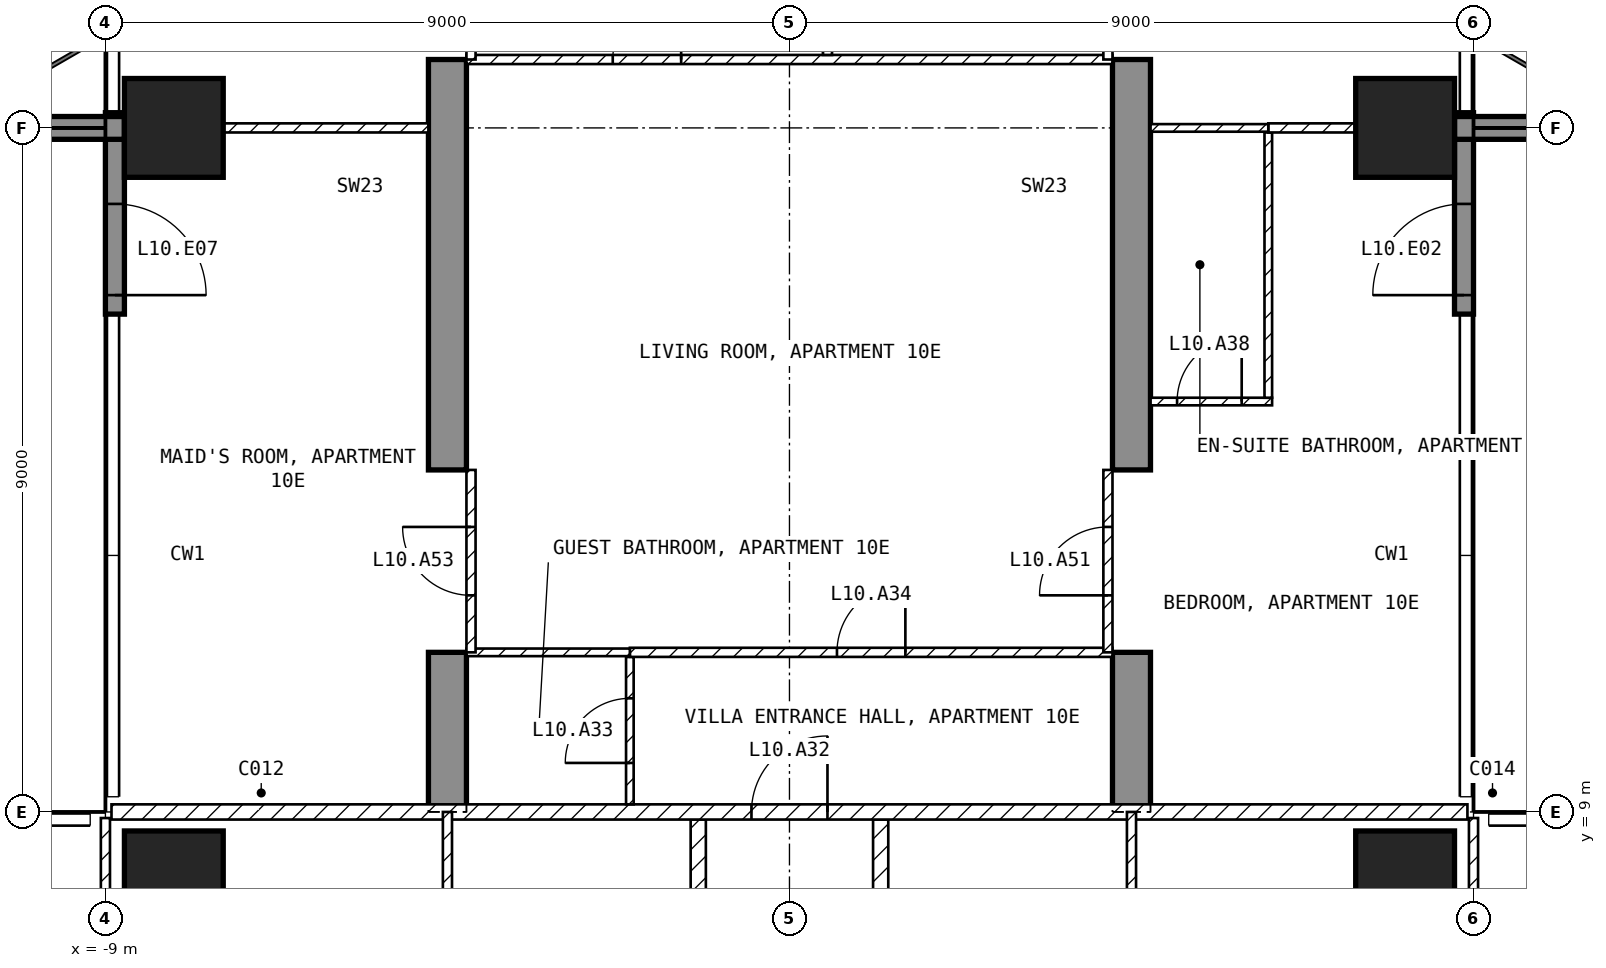
"""IFC4 building model, lengths in metres.
Left out: names, types, materials, properties, quantities, classifications, styles, units other than length and angle.
Written with IfcOpenShell. Run it as: python <this file> out.ifc"""

import sys

from ifc_helpers import new_model, si_unit, direction, frame, frame_2d, origin, origin_2d, place, context, subcontext, project, spatial, polyline, rectangle, outline, extrude, element, fill, save


model = new_model("IFC4")
c1 = context("Model", 3, precision=1e-05, world=origin(), true_north=direction((0.0, 1.0)))
c2 = subcontext(c1, "Body", "Model", "MODEL_VIEW")
j1 = project(units=[si_unit("LENGTHUNIT", "METRE"), si_unit("PLANEANGLEUNIT", "RADIAN")], contexts=[c1])
p1 = place(None, origin())
s1 = spatial("IfcSite", under=j1, at=p1, CompositionType="ELEMENT")
p2 = place(p1, origin())
s2 = spatial("IfcBuilding", under=s1, at=p2, CompositionType="ELEMENT")
p3 = place(p2, frame((0.0, 0.0, 54.0)))
s3 = spatial("IfcBuildingStorey", under=s2, at=p3, CompositionType="ELEMENT", Elevation=54.0)
for number, where, z_axis, x_axis in (
    (1, (-8.1, 8.1, -0.25), (0.0, 0.0, 1.0), (1.0, 0.0, 0.0)),
    (2, (-8.1, 18.0, -0.25), (0.0, 0.0, 1.0), (1.0, 0.0, 0.0)),
    (3, (8.1, 8.1, -0.25), (0.0, 0.0, 1.0), (1.0, 0.0, 0.0)),
    (4, (8.1, 18.0, -0.25), (0.0, 0.0, 1.0), (1.0, 0.0, 0.0)),
):
    element("IfcColumn", number, at=place(p3, frame(where, z_axis=z_axis, x_axis=x_axis)), inside=s3, PredefinedType="COLUMN", context=c2, shape_type="SweptSolid", body=[
        extrude(rectangle(XDim=1.3, YDim=1.3, at=origin_2d()), origin(), (0.0, 0.0, 1.0), 3.5),
    ])
for number, where, z_axis, x_axis in (
    (5, (-4.75, 9.0, -0.25), (1.0, 0.0, 0.0), (0.0, 1.0, 0.0)),
    (6, (4.25, 9.0, -0.25), (1.0, 0.0, 0.0), (0.0, 1.0, 0.0)),
):
    element("IfcWall", number, at=place(p3, frame(where, z_axis=z_axis, x_axis=x_axis)), inside=s3, PredefinedType="SHEAR", context=c2, shape_type="SweptSolid", body=[
        extrude(outline(polyline([(0.0, 0.0), (2.1, 0.0), (2.1, 2.65), (4.5, 2.65), (4.5, 0.0), (9.9, 0.0), (9.9, 2.65), (12.3, 2.65), (12.3, 0.0), (16.45, 0.0), (16.45, 3.5), (0.0, 3.5), (0.0, 0.0)])), origin(), (0.0, 0.0, 1.0), 0.5),
    ])
p4 = place(p3, frame((8.875, 15.55, 0.0), z_axis=(0.0, 0.0, 1.0), x_axis=(0.0, 1.0, 0.0)))
e7 = element("IfcWall", 7, at=p4, inside=s3, PredefinedType="SOLIDWALL", context=c2, shape_type="SweptSolid", body=[
    extrude(rectangle(XDim=2.65, YDim=0.25, at=frame_2d((1.325, 0.0))), origin(), (0.0, 0.0, 1.0), 3.25),
])
p5 = place(p4, frame((0.25, 0.0, 0.0)))
e8 = element("IfcOpeningElement", 8, at=p5, cuts=e7, PredefinedType="OPENING", context=c2, shape_type="SweptSolid", body=[
    extrude(rectangle(XDim=1.2, YDim=2.4, at=frame_2d((0.6, 1.2))), frame((0.0, 0.135, 0.0), z_axis=(0.0, -1.0, 0.0), x_axis=(1.0, 0.0, 0.0)), (0.0, 0.0, 1.0), 0.27),
])
p6 = place(p3, frame((-8.875, 18.2, 0.0), z_axis=(0.0, 0.0, 1.0), x_axis=(0.0, -1.0, 0.0)))
e9 = element("IfcWall", 9, at=p6, inside=s3, PredefinedType="SOLIDWALL", context=c2, shape_type="SweptSolid", body=[
    extrude(rectangle(XDim=2.65, YDim=0.25, at=frame_2d((1.325, 0.0))), origin(), (0.0, 0.0, 1.0), 3.25),
])
p7 = place(p6, frame((1.2, 0.0, 0.0)))
e10 = element("IfcOpeningElement", 10, at=p7, cuts=e9, PredefinedType="OPENING", context=c2, shape_type="SweptSolid", body=[
    extrude(rectangle(XDim=1.2, YDim=2.4, at=frame_2d((0.6, 1.2))), frame((0.0, 0.135, 0.0), z_axis=(0.0, -1.0, 0.0), x_axis=(1.0, 0.0, 0.0)), (0.0, 0.0, 1.0), 0.27),
])
for number, where, z_axis, x_axis in (
    (11, (-8.75, 18.0, 0.0), (0.0, 0.0, 1.0), (-1.0, 0.0, 0.0)),
    (12, (8.75, 18.0, 0.0), (0.0, 0.0, 1.0), (1.0, 0.0, 0.0)),
):
    element("IfcWall", number, at=place(p3, frame(where, z_axis=z_axis, x_axis=x_axis)), inside=s3, PredefinedType="SOLIDWALL", context=c2, shape_type="SweptSolid", body=[
        extrude(rectangle(XDim=2.95, YDim=0.3, at=frame_2d((1.475, 0.0))), origin(), (0.0, 0.0, 1.0), 3.25),
    ])
for number, where, z_axis, x_axis in (
    (13, (1.2, 8.9, 0.0), (0.0, 0.0, 1.0), (0.0, -1.0, 0.0)),
    (14, (-1.2, 1.3, 0.0), (0.0, 0.0, 1.0), (0.0, 1.0, 0.0)),
):
    element("IfcWall", number, at=place(p3, frame(where, z_axis=z_axis, x_axis=x_axis)), inside=s3, PredefinedType="PARTITIONING", context=c2, shape_type="SweptSolid", body=[
        extrude(rectangle(XDim=7.6, YDim=0.2, at=frame_2d((3.8, 0.0))), origin(), (0.0, 0.0, 1.0), 3.25),
    ])
p8 = place(p3, frame((-8.92, 9.0, 0.0), z_axis=(0.0, 0.0, 1.0), x_axis=(1.0, 0.0, 0.0)))
e15 = element("IfcWall", 15, at=p8, inside=s3, PredefinedType="PARTITIONING", context=c2, shape_type="SweptSolid", body=[
    extrude(rectangle(XDim=17.84, YDim=0.2, at=frame_2d((8.92, 0.0))), origin(), (0.0, 0.0, 1.0), 3.25),
])
p9 = place(p8, frame((8.42, 0.0, 0.0)))
e16 = element("IfcOpeningElement", 16, at=p9, cuts=e15, PredefinedType="OPENING", context=c2, shape_type="SweptSolid", body=[
    extrude(rectangle(XDim=1.0, YDim=2.1, at=frame_2d((0.5, 1.05))), frame((0.0, 0.11, 0.0), z_axis=(0.0, -1.0, 0.0), x_axis=(1.0, 0.0, 0.0)), (0.0, 0.0, 1.0), 0.22),
])
p10 = place(p3, frame((9.0, 1.3, 0.0), z_axis=(0.0, 0.0, 1.0), x_axis=(0.0, 1.0, 0.0)))
e17 = element("IfcWall", 17, at=p10, inside=s3, PredefinedType="PARTITIONING", context=c2, shape_type="SweptSolid", body=[
    extrude(rectangle(XDim=7.62, YDim=0.12, at=frame_2d((3.81, 0.0))), origin(), (0.0, 0.0, 1.0), 3.25),
])
p11 = place(p10, frame((0.85, 0.0, 0.0)))
e18 = element("IfcOpeningElement", 18, at=p11, cuts=e17, PredefinedType="OPENING", context=c2, shape_type="SweptSolid", body=[
    extrude(rectangle(XDim=0.9, YDim=2.1, at=frame_2d((0.45, 1.05))), frame((0.0, 0.07, 0.0), z_axis=(0.0, -1.0, 0.0), x_axis=(1.0, 0.0, 0.0)), (0.0, 0.0, 1.0), 0.14),
])
p12 = place(p3, frame((4.5, 1.3, 0.0), z_axis=(0.0, 0.0, 1.0), x_axis=(0.0, 1.0, 0.0)))
e19 = element("IfcWall", 19, at=p12, inside=s3, PredefinedType="PARTITIONING", context=c2, shape_type="SweptSolid", body=[
    extrude(rectangle(XDim=7.7, YDim=0.12, at=frame_2d((3.85, 0.0))), origin(), (0.0, 0.0, 1.0), 3.25),
])
p13 = place(p12, frame((3.4, 0.0, 0.0)))
e20 = element("IfcOpeningElement", 20, at=p13, cuts=e19, PredefinedType="OPENING", context=c2, shape_type="SweptSolid", body=[
    extrude(rectangle(XDim=0.9, YDim=2.1, at=frame_2d((0.45, 1.05))), frame((0.0, 0.07, 0.0), z_axis=(0.0, -1.0, 0.0), x_axis=(1.0, 0.0, 0.0)), (0.0, 0.0, 1.0), 0.14),
])
p14 = place(p3, frame((-9.0, 8.92, 0.0), z_axis=(0.0, 0.0, 1.0), x_axis=(0.0, -1.0, 0.0)))
e21 = element("IfcWall", 21, at=p14, inside=s3, PredefinedType="PARTITIONING", context=c2, shape_type="SweptSolid", body=[
    extrude(rectangle(XDim=7.62, YDim=0.12, at=frame_2d((3.81, 0.0))), origin(), (0.0, 0.0, 1.0), 3.25),
])
p15 = place(p14, frame((2.67, 0.0, 0.0)))
e22 = element("IfcOpeningElement", 22, at=p15, cuts=e21, PredefinedType="OPENING", context=c2, shape_type="SweptSolid", body=[
    extrude(rectangle(XDim=0.9, YDim=2.1, at=frame_2d((0.45, 1.05))), frame((0.0, 0.07, 0.0), z_axis=(0.0, -1.0, 0.0), x_axis=(1.0, 0.0, 0.0)), (0.0, 0.0, 1.0), 0.14),
])
p16 = place(p3, frame((-4.5, 9.0, 0.0), z_axis=(0.0, 0.0, 1.0), x_axis=(0.0, -1.0, 0.0)))
e23 = element("IfcWall", 23, at=p16, inside=s3, PredefinedType="PARTITIONING", context=c2, shape_type="SweptSolid", body=[
    extrude(rectangle(XDim=3.9, YDim=0.12, at=frame_2d((1.95, 0.0))), origin(), (0.0, 0.0, 1.0), 3.25),
])
p17 = place(p16, frame((1.5, 0.0, 0.0)))
e24 = element("IfcOpeningElement", 24, at=p17, cuts=e23, PredefinedType="OPENING", context=c2, shape_type="SweptSolid", body=[
    extrude(rectangle(XDim=0.9, YDim=2.1, at=frame_2d((0.45, 1.05))), frame((0.0, 0.07, 0.0), z_axis=(0.0, -1.0, 0.0), x_axis=(1.0, 0.0, 0.0)), (0.0, 0.0, 1.0), 0.14),
])
p18 = place(p3, frame((-2.1, 9.1, 0.0), z_axis=(0.0, 0.0, 1.0), x_axis=(0.0, 1.0, 0.0)))
e25 = element("IfcWall", 25, at=p18, inside=s3, PredefinedType="PARTITIONING", context=c2, shape_type="SweptSolid", body=[
    extrude(rectangle(XDim=1.94, YDim=0.1, at=frame_2d((0.97, 0.0))), origin(), (0.0, 0.0, 1.0), 3.25),
])
p19 = place(p18, frame((0.545, 0.0, 0.0)))
e26 = element("IfcOpeningElement", 26, at=p19, cuts=e25, PredefinedType="OPENING", context=c2, shape_type="SweptSolid", body=[
    extrude(rectangle(XDim=0.85, YDim=2.1, at=frame_2d((0.425, 1.05))), frame((0.0, 0.06, 0.0), z_axis=(0.0, -1.0, 0.0), x_axis=(1.0, 0.0, 0.0)), (0.0, 0.0, 1.0), 0.12),
])
p20 = place(p3, frame((-2.1, 11.1, 0.0), z_axis=(0.0, 0.0, 1.0), x_axis=(1.0, 0.0, 0.0)))
e27 = element("IfcWall", 27, at=p20, inside=s3, PredefinedType="PARTITIONING", context=c2, shape_type="SweptSolid", body=[
    extrude(rectangle(XDim=6.35, YDim=0.12, at=frame_2d((3.175, 0.0))), origin(), (0.0, 0.0, 1.0), 3.25),
])
p21 = place(p20, frame((2.725, 0.0, 0.0)))
e28 = element("IfcOpeningElement", 28, at=p21, cuts=e27, PredefinedType="OPENING", context=c2, shape_type="SweptSolid", body=[
    extrude(rectangle(XDim=0.9, YDim=2.1, at=frame_2d((0.45, 1.05))), frame((0.0, 0.07, 0.0), z_axis=(0.0, -1.0, 0.0), x_axis=(1.0, 0.0, 0.0)), (0.0, 0.0, 1.0), 0.14),
])
p22 = place(p3, frame((-4.25, 11.1, 0.0), z_axis=(0.0, 0.0, 1.0), x_axis=(1.0, 0.0, 0.0)))
e29 = element("IfcWall", 29, at=p22, inside=s3, PredefinedType="PARTITIONING", context=c2, shape_type="SweptSolid", body=[
    extrude(rectangle(XDim=2.15, YDim=0.1, at=frame_2d((1.075, 0.0))), origin(), (0.0, 0.0, 1.0), 3.25),
])
p23 = place(p3, frame((-4.25, 18.9, 0.0), z_axis=(0.0, 0.0, 1.0), x_axis=(1.0, 0.0, 0.0)))
e30 = element("IfcWall", 30, at=p23, inside=s3, PredefinedType="PARTITIONING", context=c2, shape_type="SweptSolid", body=[
    extrude(rectangle(XDim=8.5, YDim=0.12, at=frame_2d((4.25, 0.0))), origin(), (0.0, 0.0, 1.0), 3.25),
])
p24 = place(p23, frame((1.925, 0.0, 0.0)))
e31 = element("IfcOpeningElement", 31, at=p24, cuts=e30, PredefinedType="OPENING", context=c2, shape_type="SweptSolid", body=[
    extrude(rectangle(XDim=0.9, YDim=2.1, at=frame_2d((0.45, 1.05))), frame((0.0, 0.07, 0.0), z_axis=(0.0, -1.0, 0.0), x_axis=(1.0, 0.0, 0.0)), (0.0, 0.0, 1.0), 0.14),
])
p25 = place(p3, frame((0.5, 23.34, 0.0), z_axis=(0.0, 0.0, 1.0), x_axis=(0.0, -1.0, 0.0)))
e32 = element("IfcWall", 32, at=p25, inside=s3, PredefinedType="PARTITIONING", context=c2, shape_type="SweptSolid", body=[
    extrude(rectangle(XDim=4.38, YDim=0.12, at=frame_2d((2.19, 0.0))), origin(), (0.0, 0.0, 1.0), 3.25),
])
p26 = place(p25, frame((1.74, 0.0, 0.0)))
e33 = element("IfcOpeningElement", 33, at=p26, cuts=e32, PredefinedType="OPENING", context=c2, shape_type="SweptSolid", body=[
    extrude(rectangle(XDim=0.9, YDim=2.1, at=frame_2d((0.45, 1.05))), frame((0.0, 0.07, 0.0), z_axis=(0.0, -1.0, 0.0), x_axis=(1.0, 0.0, 0.0)), (0.0, 0.0, 1.0), 0.14),
])
p27 = place(p3, frame((4.75, 14.4, 0.0), z_axis=(0.0, 0.0, 1.0), x_axis=(1.0, 0.0, 0.0)))
e34 = element("IfcWall", 34, at=p27, inside=s3, PredefinedType="PARTITIONING", context=c2, shape_type="SweptSolid", body=[
    extrude(rectangle(XDim=1.6, YDim=0.1, at=frame_2d((0.8, 0.0))), origin(), (0.0, 0.0, 1.0), 3.25),
])
p28 = place(p27, frame((0.35, 0.0, 0.0)))
e35 = element("IfcOpeningElement", 35, at=p28, cuts=e34, PredefinedType="OPENING", context=c2, shape_type="SweptSolid", body=[
    extrude(rectangle(XDim=0.85, YDim=2.1, at=frame_2d((0.425, 1.05))), frame((0.0, 0.06, 0.0), z_axis=(0.0, -1.0, 0.0), x_axis=(1.0, 0.0, 0.0)), (0.0, 0.0, 1.0), 0.12),
])
p29 = place(p3, frame((6.3, 14.45, 0.0), z_axis=(0.0, 0.0, 1.0), x_axis=(0.0, 1.0, 0.0)))
e36 = element("IfcWall", 36, at=p29, inside=s3, PredefinedType="PARTITIONING", context=c2, shape_type="SweptSolid", body=[
    extrude(rectangle(XDim=3.49, YDim=0.1, at=frame_2d((1.745, 0.0))), origin(), (0.0, 0.0, 1.0), 3.25),
])
p30 = place(p3, frame((6.3, 18.0, 0.0), z_axis=(0.0, 0.0, 1.0), x_axis=(1.0, 0.0, 0.0)))
e37 = element("IfcWall", 37, at=p30, inside=s3, PredefinedType="PARTITIONING", context=c2, shape_type="SweptSolid", body=[
    extrude(rectangle(XDim=1.15, YDim=0.12, at=frame_2d((0.575, 0.0))), origin(), (0.0, 0.0, 1.0), 2.346),
])
p31 = place(p3, frame((4.75, 18.0, 0.0), z_axis=(0.0, 0.0, 1.0), x_axis=(1.0, 0.0, 0.0)))
e38 = element("IfcWall", 38, at=p31, inside=s3, PredefinedType="PARTITIONING", context=c2, shape_type="SweptSolid", body=[
    extrude(rectangle(XDim=1.55, YDim=0.1, at=frame_2d((0.775, 0.0))), origin(), (0.0, 0.0, 1.0), 2.346),
])
p32 = place(p3, frame((-7.45, 18.0, 0.0), z_axis=(0.0, 0.0, 1.0), x_axis=(1.0, 0.0, 0.0)))
e39 = element("IfcWall", 39, at=p32, inside=s3, PredefinedType="PARTITIONING", context=c2, shape_type="SweptSolid", body=[
    extrude(rectangle(XDim=2.7, YDim=0.12, at=frame_2d((1.35, 0.0))), origin(), (0.0, 0.0, 1.0), 2.346),
])
p33 = place(p3, frame((4.19, 11.1, 0.0), z_axis=(0.0, 0.0, 1.0), x_axis=(0.0, 1.0, 0.0)))
e40 = element("IfcWall", 40, at=p33, inside=s3, PredefinedType="PARTITIONING", context=c2, shape_type="SweptSolid", body=[
    extrude(rectangle(XDim=2.4, YDim=0.12, at=frame_2d((1.2, 0.0))), origin(), (0.0, 0.0, 1.0), 2.4),
])
p34 = place(p33, frame((0.75, 0.0, 0.0)))
e41 = element("IfcOpeningElement", 41, at=p34, cuts=e40, PredefinedType="OPENING", context=c2, shape_type="SweptSolid", body=[
    extrude(rectangle(XDim=0.9, YDim=2.1, at=frame_2d((0.45, 1.05))), frame((0.0, 0.07, 0.0), z_axis=(0.0, -1.0, 0.0), x_axis=(1.0, 0.0, 0.0)), (0.0, 0.0, 1.0), 0.14),
])
p35 = place(p3, frame((4.19, 18.9, 0.0), z_axis=(0.0, 0.0, 1.0), x_axis=(0.0, 1.0, 0.0)))
e42 = element("IfcWall", 42, at=p35, inside=s3, PredefinedType="PARTITIONING", context=c2, shape_type="SweptSolid", body=[
    extrude(rectangle(XDim=2.4, YDim=0.12, at=frame_2d((1.2, 0.0))), origin(), (0.0, 0.0, 1.0), 2.4),
])
p36 = place(p35, frame((0.75, 0.0, 0.0)))
e43 = element("IfcOpeningElement", 43, at=p36, cuts=e42, PredefinedType="OPENING", context=c2, shape_type="SweptSolid", body=[
    extrude(rectangle(XDim=0.9, YDim=2.1, at=frame_2d((0.45, 1.05))), frame((0.0, 0.07, 0.0), z_axis=(0.0, -1.0, 0.0), x_axis=(1.0, 0.0, 0.0)), (0.0, 0.0, 1.0), 0.14),
])
p37 = place(p3, frame((-4.19, 11.1, 0.0), z_axis=(0.0, 0.0, 1.0), x_axis=(0.0, 1.0, 0.0)))
e44 = element("IfcWall", 44, at=p37, inside=s3, PredefinedType="PARTITIONING", context=c2, shape_type="SweptSolid", body=[
    extrude(rectangle(XDim=2.4, YDim=0.12, at=frame_2d((1.2, 0.0))), origin(), (0.0, 0.0, 1.0), 2.4),
])
p38 = place(p37, frame((0.75, 0.0, 0.0)))
e45 = element("IfcOpeningElement", 45, at=p38, cuts=e44, PredefinedType="OPENING", context=c2, shape_type="SweptSolid", body=[
    extrude(rectangle(XDim=0.9, YDim=2.1, at=frame_2d((0.45, 1.05))), frame((0.0, 0.07, 0.0), z_axis=(0.0, -1.0, 0.0), x_axis=(1.0, 0.0, 0.0)), (0.0, 0.0, 1.0), 0.14),
])
p39 = place(p3, frame((-4.19, 18.9, 0.0), z_axis=(0.0, 0.0, 1.0), x_axis=(0.0, 1.0, 0.0)))
e46 = element("IfcWall", 46, at=p39, inside=s3, PredefinedType="PARTITIONING", context=c2, shape_type="SweptSolid", body=[
    extrude(rectangle(XDim=2.4, YDim=0.12, at=frame_2d((1.2, 0.0))), origin(), (0.0, 0.0, 1.0), 2.4),
])
p40 = place(p39, frame((0.75, 0.0, 0.0)))
e47 = element("IfcOpeningElement", 47, at=p40, cuts=e46, PredefinedType="OPENING", context=c2, shape_type="SweptSolid", body=[
    extrude(rectangle(XDim=0.9, YDim=2.1, at=frame_2d((0.45, 1.05))), frame((0.0, 0.07, 0.0), z_axis=(0.0, -1.0, 0.0), x_axis=(1.0, 0.0, 0.0)), (0.0, 0.0, 1.0), 0.14),
])
p41 = place(p5, origin())
e48 = element("IfcDoor", 48, at=p41, inside=s3, OperationType="SINGLE_SWING_LEFT", PredefinedType="DOOR", context=c2, shape_type="SweptSolid", body=[
    extrude(rectangle(XDim=1.2, YDim=2.4, at=frame_2d((0.6, 1.2))), frame((0.0, 0.025, 0.0), z_axis=(0.0, -1.0, 0.0), x_axis=(1.0, 0.0, 0.0)), (0.0, 0.0, 1.0), 0.05),
])
fill(e8, e48)
p42 = place(p7, origin())
e49 = element("IfcDoor", 49, at=p42, inside=s3, OperationType="SINGLE_SWING_RIGHT", PredefinedType="DOOR", context=c2, shape_type="SweptSolid", body=[
    extrude(rectangle(XDim=1.2, YDim=2.4, at=frame_2d((0.6, 1.2))), frame((0.0, 0.025, 0.0), z_axis=(0.0, -1.0, 0.0), x_axis=(1.0, 0.0, 0.0)), (0.0, 0.0, 1.0), 0.05),
])
fill(e10, e49)
p43 = place(p9, origin())
e50 = element("IfcDoor", 50, at=p43, inside=s3, OperationType="SINGLE_SWING_RIGHT", PredefinedType="DOOR", context=c2, shape_type="SweptSolid", body=[
    extrude(rectangle(XDim=1.0, YDim=2.1, at=frame_2d((0.5, 1.05))), frame((0.0, 0.025, 0.0), z_axis=(0.0, -1.0, 0.0), x_axis=(1.0, 0.0, 0.0)), (0.0, 0.0, 1.0), 0.05),
])
fill(e16, e50)
p44 = place(p19, origin())
e51 = element("IfcDoor", 51, at=p44, inside=s3, OperationType="SINGLE_SWING_LEFT", PredefinedType="DOOR", context=c2, shape_type="SweptSolid", body=[
    extrude(rectangle(XDim=0.85, YDim=2.1, at=frame_2d((0.425, 1.05))), frame((0.0, 0.025, 0.0), z_axis=(0.0, -1.0, 0.0), x_axis=(1.0, 0.0, 0.0)), (0.0, 0.0, 1.0), 0.05),
])
fill(e26, e51)
p45 = place(p21, origin())
e52 = element("IfcDoor", 52, at=p45, inside=s3, OperationType="SINGLE_SWING_RIGHT", PredefinedType="DOOR", context=c2, shape_type="SweptSolid", body=[
    extrude(rectangle(XDim=0.9, YDim=2.1, at=frame_2d((0.45, 1.05))), frame((0.0, 0.025, 0.0), z_axis=(0.0, -1.0, 0.0), x_axis=(1.0, 0.0, 0.0)), (0.0, 0.0, 1.0), 0.05),
])
fill(e28, e52)
p46 = place(p24, origin())
e53 = element("IfcDoor", 53, at=p46, inside=s3, OperationType="SINGLE_SWING_RIGHT", PredefinedType="DOOR", context=c2, shape_type="SweptSolid", body=[
    extrude(rectangle(XDim=0.9, YDim=2.1, at=frame_2d((0.45, 1.05))), frame((0.0, 0.025, 0.0), z_axis=(0.0, -1.0, 0.0), x_axis=(1.0, 0.0, 0.0)), (0.0, 0.0, 1.0), 0.05),
])
fill(e31, e53)
p47 = place(p28, origin())
e54 = element("IfcDoor", 54, at=p47, inside=s3, OperationType="SINGLE_SWING_RIGHT", PredefinedType="DOOR", context=c2, shape_type="SweptSolid", body=[
    extrude(rectangle(XDim=0.85, YDim=2.1, at=frame_2d((0.425, 1.05))), frame((0.0, 0.025, 0.0), z_axis=(0.0, -1.0, 0.0), x_axis=(1.0, 0.0, 0.0)), (0.0, 0.0, 1.0), 0.05),
])
fill(e35, e54)
p48 = place(p34, origin())
e55 = element("IfcDoor", 55, at=p48, inside=s3, OperationType="SINGLE_SWING_LEFT", PredefinedType="DOOR", context=c2, shape_type="SweptSolid", body=[
    extrude(rectangle(XDim=0.9, YDim=2.1, at=frame_2d((0.45, 1.05))), frame((0.0, 0.025, 0.0), z_axis=(0.0, -1.0, 0.0), x_axis=(1.0, 0.0, 0.0)), (0.0, 0.0, 1.0), 0.05),
])
fill(e41, e55)
p49 = place(p38, origin())
e56 = element("IfcDoor", 56, at=p49, inside=s3, OperationType="SINGLE_SWING_RIGHT", PredefinedType="DOOR", context=c2, shape_type="SweptSolid", body=[
    extrude(rectangle(XDim=0.9, YDim=2.1, at=frame_2d((0.45, 1.05))), frame((0.0, 0.025, 0.0), z_axis=(0.0, -1.0, 0.0), x_axis=(1.0, 0.0, 0.0)), (0.0, 0.0, 1.0), 0.05),
])
fill(e45, e56)
save(model, sys.argv[1])
